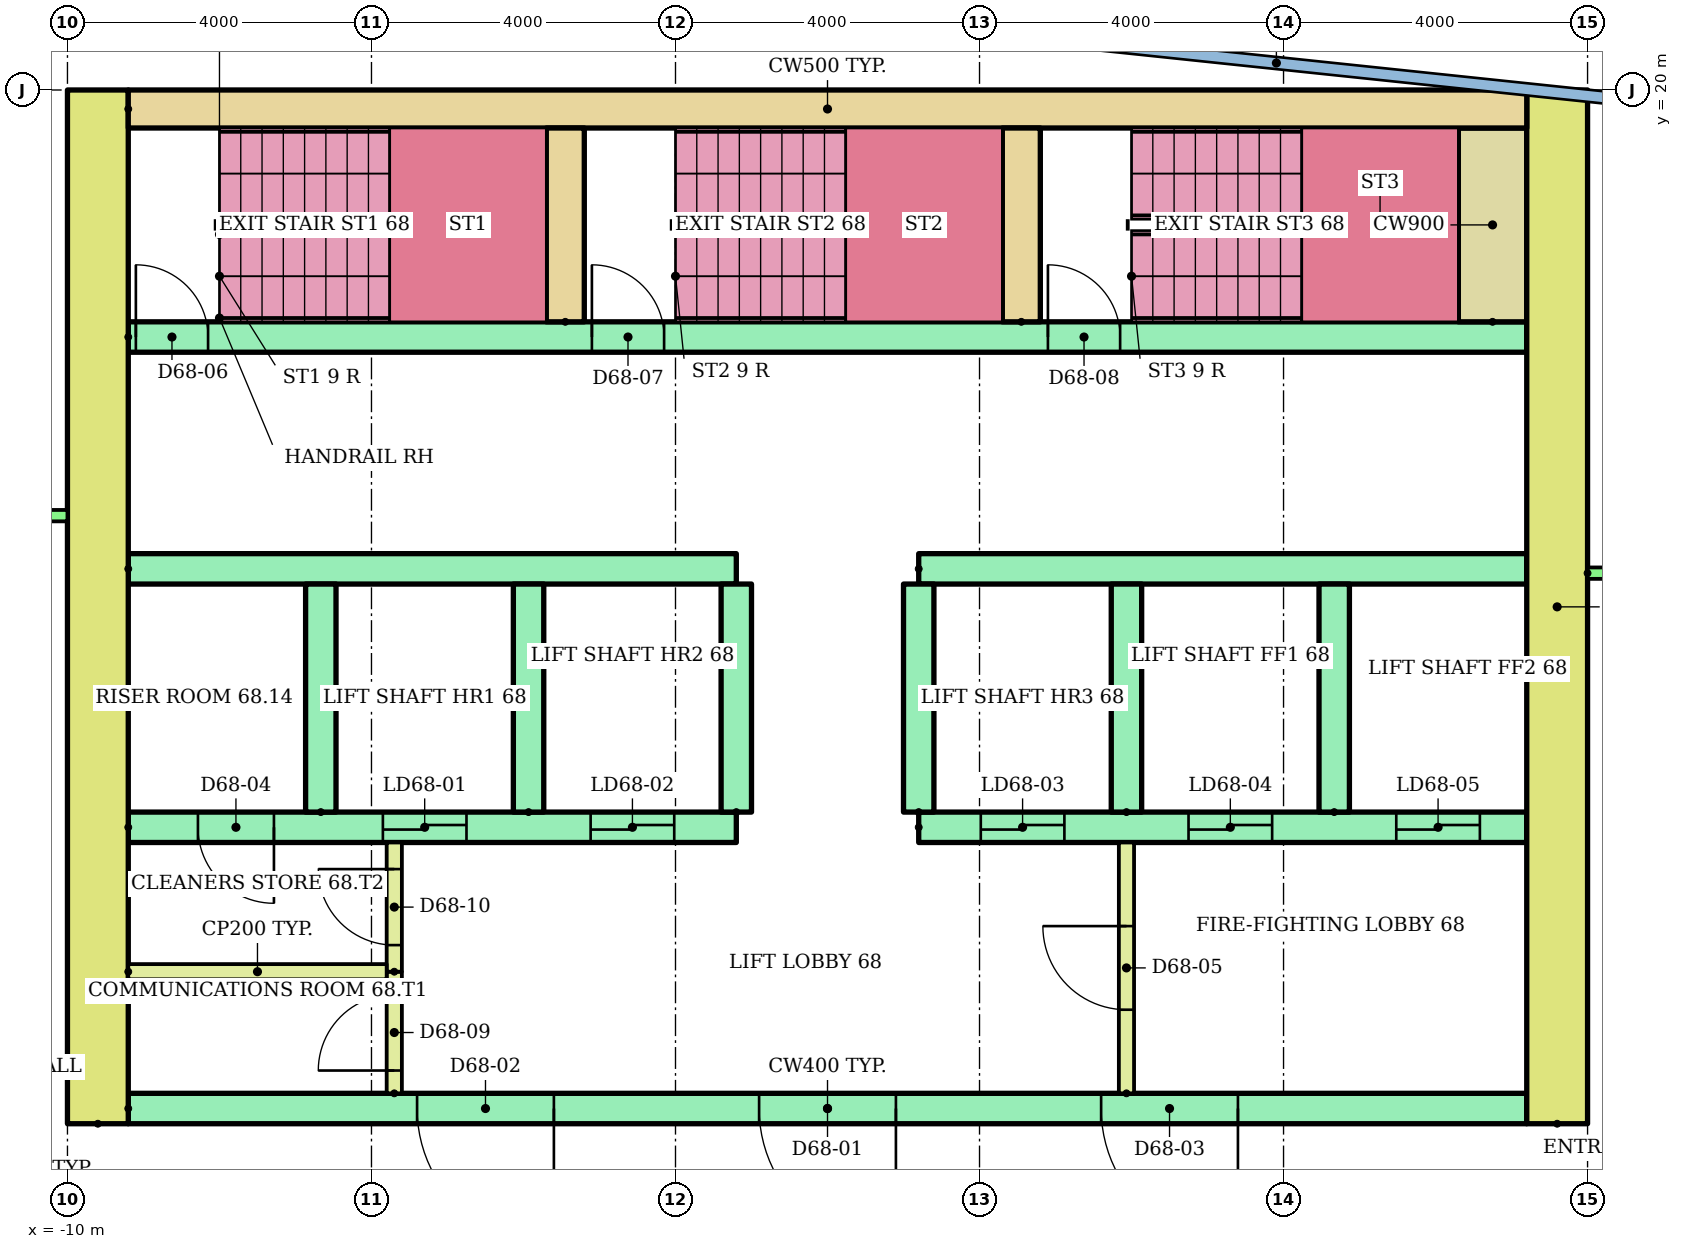
"""IFC4 building model, lengths in metres.
Left out: names, types, materials, properties, quantities, classifications, styles, units other than length and angle.
Written with IfcOpenShell. Run it as: python <this file> out.ifc"""

import sys

from ifc_helpers import new_model, si_unit, direction, frame, frame_2d, origin, place, context, subcontext, project, spatial, rectangle, extrude, element, fill, save


model = new_model("IFC4")
c1 = context("Model", 3, precision=1e-05, world=origin(), true_north=direction((0.0, 1.0)))
c2 = subcontext(c1, "Body", "Model", "MODEL_VIEW")
j1 = project(units=[si_unit("LENGTHUNIT", "METRE"), si_unit("PLANEANGLEUNIT", "RADIAN")], contexts=[c1])
p1 = place(None, origin())
s1 = spatial("IfcSite", under=j1, at=p1, CompositionType="ELEMENT")
p2 = place(p1, origin())
s2 = spatial("IfcBuilding", under=s1, at=p2, CompositionType="ELEMENT")
p3 = place(p2, frame((0.0, 0.0, 262.7)))
s3 = spatial("IfcBuildingStorey", under=s2, at=p3, CompositionType="ELEMENT", Elevation=262.7)
for number, where, z_axis, x_axis in (
    (1, (-9.6, 6.4, 0.0), (0.0, 0.0, 1.0), (0.0, 1.0, 0.0)),
    (2, (9.6, 6.4, 0.0), (0.0, 0.0, 1.0), (0.0, 1.0, 0.0)),
):
    element("IfcWall", number, at=place(p3, frame(where, z_axis=z_axis, x_axis=x_axis)), inside=s3, PredefinedType="SHEAR", context=c2, shape_type="SweptSolid", body=[
        extrude(rectangle(XDim=13.6, YDim=0.8, at=frame_2d((6.8, 0.0))), origin(), (0.0, 0.0, 1.0), 2.92),
    ])
p4 = place(p3, frame((-9.2, 19.75, 0.0)))
e3 = element("IfcWall", 3, at=p4, inside=s3, PredefinedType="SHEAR", context=c2, shape_type="SweptSolid", body=[
    extrude(rectangle(XDim=18.4, YDim=0.5, at=frame_2d((9.2, 0.0))), origin(), (0.0, 0.0, 1.0), 2.92),
])
p5 = place(p3, frame((-9.2, 6.6, 0.0)))
e4 = element("IfcWall", 4, at=p5, inside=s3, PredefinedType="SHEAR", context=c2, shape_type="SweptSolid", body=[
    extrude(rectangle(XDim=18.4, YDim=0.4, at=frame_2d((9.2, 0.0))), origin(), (0.0, 0.0, 1.0), 2.92),
])
p6 = place(p5, frame((8.3, 0.0, 0.0)))
e5 = element("IfcOpeningElement", 5, at=p6, cuts=e4, PredefinedType="OPENING", context=c2, shape_type="SweptSolid", body=[
    extrude(rectangle(XDim=1.8, YDim=2.1, at=frame_2d((0.9, 1.05))), frame((0.0, 0.21, 0.0), z_axis=(0.0, -1.0, 0.0), x_axis=(1.0, 0.0, 0.0)), (0.0, 0.0, 1.0), 0.42),
])
p7 = place(p5, frame((3.8, 0.0, 0.0)))
e6 = element("IfcOpeningElement", 6, at=p7, cuts=e4, PredefinedType="OPENING", context=c2, shape_type="SweptSolid", body=[
    extrude(rectangle(XDim=1.8, YDim=2.1, at=frame_2d((0.9, 1.05))), frame((0.0, 0.21, 0.0), z_axis=(0.0, -1.0, 0.0), x_axis=(1.0, 0.0, 0.0)), (0.0, 0.0, 1.0), 0.42),
])
p8 = place(p5, frame((12.8, 0.0, 0.0)))
e7 = element("IfcOpeningElement", 7, at=p8, cuts=e4, PredefinedType="OPENING", context=c2, shape_type="SweptSolid", body=[
    extrude(rectangle(XDim=1.8, YDim=2.1, at=frame_2d((0.9, 1.05))), frame((0.0, 0.21, 0.0), z_axis=(0.0, -1.0, 0.0), x_axis=(1.0, 0.0, 0.0)), (0.0, 0.0, 1.0), 0.42),
])
p9 = place(p3, frame((-9.2, 10.3, 0.0)))
e8 = element("IfcWall", 8, at=p9, inside=s3, PredefinedType="SHEAR", context=c2, shape_type="SweptSolid", body=[
    extrude(rectangle(XDim=8.0, YDim=0.4, at=frame_2d((4.0, 0.0))), origin(), (0.0, 0.0, 1.0), 2.92),
])
p10 = place(p9, frame((3.35, 0.0, 0.0)))
e9 = element("IfcOpeningElement", 9, at=p10, cuts=e8, PredefinedType="OPENING", context=c2, shape_type="SweptSolid", body=[
    extrude(rectangle(XDim=1.1, YDim=2.1, at=frame_2d((0.55, 1.05))), frame((0.0, 0.21, 0.0), z_axis=(0.0, -1.0, 0.0), x_axis=(1.0, 0.0, 0.0)), (0.0, 0.0, 1.0), 0.42),
])
p11 = place(p9, frame((6.083, 0.0, 0.0)))
e10 = element("IfcOpeningElement", 10, at=p11, cuts=e8, PredefinedType="OPENING", context=c2, shape_type="SweptSolid", body=[
    extrude(rectangle(XDim=1.1, YDim=2.1, at=frame_2d((0.55, 1.05))), frame((0.0, 0.21, 0.0), z_axis=(0.0, -1.0, 0.0), x_axis=(1.0, 0.0, 0.0)), (0.0, 0.0, 1.0), 0.42),
])
p12 = place(p9, frame((0.917, 0.0, 0.0)))
e11 = element("IfcOpeningElement", 11, at=p12, cuts=e8, PredefinedType="OPENING", context=c2, shape_type="SweptSolid", body=[
    extrude(rectangle(XDim=1.0, YDim=2.1, at=frame_2d((0.5, 1.05))), frame((0.0, 0.21, 0.0), z_axis=(0.0, -1.0, 0.0), x_axis=(1.0, 0.0, 0.0)), (0.0, 0.0, 1.0), 0.42),
])
p13 = place(p3, frame((-9.2, 13.7, 0.0)))
e12 = element("IfcWall", 12, at=p13, inside=s3, PredefinedType="SHEAR", context=c2, shape_type="SweptSolid", body=[
    extrude(rectangle(XDim=8.0, YDim=0.4, at=frame_2d((4.0, 0.0))), origin(), (0.0, 0.0, 1.0), 2.92),
])
p14 = place(p3, frame((1.2, 10.3, 0.0)))
e13 = element("IfcWall", 13, at=p14, inside=s3, PredefinedType="SHEAR", context=c2, shape_type="SweptSolid", body=[
    extrude(rectangle(XDim=8.0, YDim=0.4, at=frame_2d((4.0, 0.0))), origin(), (0.0, 0.0, 1.0), 2.92),
])
p15 = place(p14, frame((0.817, 0.0, 0.0)))
e14 = element("IfcOpeningElement", 14, at=p15, cuts=e13, PredefinedType="OPENING", context=c2, shape_type="SweptSolid", body=[
    extrude(rectangle(XDim=1.1, YDim=2.1, at=frame_2d((0.55, 1.05))), frame((0.0, 0.21, 0.0), z_axis=(0.0, -1.0, 0.0), x_axis=(1.0, 0.0, 0.0)), (0.0, 0.0, 1.0), 0.42),
])
p16 = place(p14, frame((3.55, 0.0, 0.0)))
e15 = element("IfcOpeningElement", 15, at=p16, cuts=e13, PredefinedType="OPENING", context=c2, shape_type="SweptSolid", body=[
    extrude(rectangle(XDim=1.1, YDim=2.1, at=frame_2d((0.55, 1.05))), frame((0.0, 0.21, 0.0), z_axis=(0.0, -1.0, 0.0), x_axis=(1.0, 0.0, 0.0)), (0.0, 0.0, 1.0), 0.42),
])
p17 = place(p14, frame((6.283, 0.0, 0.0)))
e16 = element("IfcOpeningElement", 16, at=p17, cuts=e13, PredefinedType="OPENING", context=c2, shape_type="SweptSolid", body=[
    extrude(rectangle(XDim=1.1, YDim=2.1, at=frame_2d((0.55, 1.05))), frame((0.0, 0.21, 0.0), z_axis=(0.0, -1.0, 0.0), x_axis=(1.0, 0.0, 0.0)), (0.0, 0.0, 1.0), 0.42),
])
p18 = place(p3, frame((1.2, 13.7, 0.0)))
e17 = element("IfcWall", 17, at=p18, inside=s3, PredefinedType="SHEAR", context=c2, shape_type="SweptSolid", body=[
    extrude(rectangle(XDim=8.0, YDim=0.4, at=frame_2d((4.0, 0.0))), origin(), (0.0, 0.0, 1.0), 2.92),
])
for number, where, z_axis, x_axis in (
    (18, (-6.667, 10.5, 0.0), (0.0, 0.0, 1.0), (0.0, 1.0, 0.0)),
    (19, (-3.933, 10.5, 0.0), (0.0, 0.0, 1.0), (0.0, 1.0, 0.0)),
    (20, (-1.2, 10.5, 0.0), (0.0, 0.0, 1.0), (0.0, 1.0, 0.0)),
    (21, (1.2, 10.5, 0.0), (0.0, 0.0, 1.0), (0.0, 1.0, 0.0)),
    (22, (3.933, 10.5, 0.0), (0.0, 0.0, 1.0), (0.0, 1.0, 0.0)),
    (23, (6.667, 10.5, 0.0), (0.0, 0.0, 1.0), (0.0, 1.0, 0.0)),
):
    element("IfcWall", number, at=place(p3, frame(where, z_axis=z_axis, x_axis=x_axis)), inside=s3, PredefinedType="SHEAR", context=c2, shape_type="SweptSolid", body=[
        extrude(rectangle(XDim=3.0, YDim=0.4, at=frame_2d((1.5, 0.0))), origin(), (0.0, 0.0, 1.0), 2.92),
    ])
p19 = place(p3, frame((3.933, 6.8, 0.0), z_axis=(0.0, 0.0, 1.0), x_axis=(0.0, 1.0, 0.0)))
e24 = element("IfcWall", 24, at=p19, inside=s3, PredefinedType="PARTITIONING", context=c2, shape_type="SweptSolid", body=[
    extrude(rectangle(XDim=3.3, YDim=0.2, at=frame_2d((1.65, 0.0))), origin(), (0.0, 0.0, 1.0), 2.92),
])
p20 = place(p19, frame((1.1, 0.0, 0.0)))
e25 = element("IfcOpeningElement", 25, at=p20, cuts=e24, PredefinedType="OPENING", context=c2, shape_type="SweptSolid", body=[
    extrude(rectangle(XDim=1.1, YDim=2.1, at=frame_2d((0.55, 1.05))), frame((0.0, 0.11, 0.0), z_axis=(0.0, -1.0, 0.0), x_axis=(1.0, 0.0, 0.0)), (0.0, 0.0, 1.0), 0.22),
])
p21 = place(p3, frame((-9.2, 16.75, 0.0)))
e26 = element("IfcWall", 26, at=p21, inside=s3, PredefinedType="SHEAR", context=c2, shape_type="SweptSolid", body=[
    extrude(rectangle(XDim=18.4, YDim=0.4, at=frame_2d((9.2, 0.0))), origin(), (0.0, 0.0, 1.0), 2.92),
])
p22 = place(p21, frame((0.1, 0.0, 0.0)))
e27 = element("IfcOpeningElement", 27, at=p22, cuts=e26, PredefinedType="OPENING", context=c2, shape_type="SweptSolid", body=[
    extrude(rectangle(XDim=0.95, YDim=2.1, at=frame_2d((0.475, 1.05))), frame((0.0, 0.21, 0.0), z_axis=(0.0, -1.0, 0.0), x_axis=(1.0, 0.0, 0.0)), (0.0, 0.0, 1.0), 0.42),
])
p23 = place(p21, frame((6.1, 0.0, 0.0)))
e28 = element("IfcOpeningElement", 28, at=p23, cuts=e26, PredefinedType="OPENING", context=c2, shape_type="SweptSolid", body=[
    extrude(rectangle(XDim=0.95, YDim=2.1, at=frame_2d((0.475, 1.05))), frame((0.0, 0.21, 0.0), z_axis=(0.0, -1.0, 0.0), x_axis=(1.0, 0.0, 0.0)), (0.0, 0.0, 1.0), 0.42),
])
p24 = place(p21, frame((12.1, 0.0, 0.0)))
e29 = element("IfcOpeningElement", 29, at=p24, cuts=e26, PredefinedType="OPENING", context=c2, shape_type="SweptSolid", body=[
    extrude(rectangle(XDim=0.95, YDim=2.1, at=frame_2d((0.475, 1.05))), frame((0.0, 0.21, 0.0), z_axis=(0.0, -1.0, 0.0), x_axis=(1.0, 0.0, 0.0)), (0.0, 0.0, 1.0), 0.42),
])
for number, where, z_axis, x_axis in (
    (30, (-3.45, 16.95, 0.0), (0.0, 0.0, 1.0), (0.0, 1.0, 0.0)),
    (31, (2.55, 16.95, 0.0), (0.0, 0.0, 1.0), (0.0, 1.0, 0.0)),
):
    element("IfcWall", number, at=place(p3, frame(where, z_axis=z_axis, x_axis=x_axis)), inside=s3, PredefinedType="SHEAR", context=c2, shape_type="SweptSolid", body=[
        extrude(rectangle(XDim=2.55, YDim=0.5, at=frame_2d((1.275, 0.0))), origin(), (0.0, 0.0, 1.0), 2.92),
    ])
p25 = place(p3, frame((8.75, 16.95, 0.0), z_axis=(0.0, 0.0, 1.0), x_axis=(0.0, 1.0, 0.0)))
e32 = element("IfcWall", 32, at=p25, inside=s3, PredefinedType="SHEAR", context=c2, shape_type="SweptSolid", body=[
    extrude(rectangle(XDim=2.55, YDim=0.9, at=frame_2d((1.275, 0.0))), origin(), (0.0, 0.0, 1.0), 2.92),
])
p26 = place(p3, frame((-5.7, 6.8, 0.0), z_axis=(0.0, 0.0, 1.0), x_axis=(0.0, 1.0, 0.0)))
e33 = element("IfcWall", 33, at=p26, inside=s3, PredefinedType="PARTITIONING", context=c2, shape_type="SweptSolid", body=[
    extrude(rectangle(XDim=1.6, YDim=0.2, at=frame_2d((0.8, 0.0))), origin(), (0.0, 0.0, 1.0), 2.92),
])
p27 = place(p26, frame((0.3, 0.0, 0.0)))
e34 = element("IfcOpeningElement", 34, at=p27, cuts=e33, PredefinedType="OPENING", context=c2, shape_type="SweptSolid", body=[
    extrude(rectangle(XDim=1.0, YDim=2.1, at=frame_2d((0.5, 1.05))), frame((0.0, 0.11, 0.0), z_axis=(0.0, -1.0, 0.0), x_axis=(1.0, 0.0, 0.0)), (0.0, 0.0, 1.0), 0.22),
])
p28 = place(p3, frame((-5.7, 8.4, 0.0), z_axis=(0.0, 0.0, 1.0), x_axis=(0.0, 1.0, 0.0)))
e35 = element("IfcWall", 35, at=p28, inside=s3, PredefinedType="PARTITIONING", context=c2, shape_type="SweptSolid", body=[
    extrude(rectangle(XDim=1.7, YDim=0.2, at=frame_2d((0.85, 0.0))), origin(), (0.0, 0.0, 1.0), 2.92),
])
p29 = place(p28, frame((0.35, 0.0, 0.0)))
e36 = element("IfcOpeningElement", 36, at=p29, cuts=e35, PredefinedType="OPENING", context=c2, shape_type="SweptSolid", body=[
    extrude(rectangle(XDim=1.0, YDim=2.1, at=frame_2d((0.5, 1.05))), frame((0.0, 0.11, 0.0), z_axis=(0.0, -1.0, 0.0), x_axis=(1.0, 0.0, 0.0)), (0.0, 0.0, 1.0), 0.22),
])
p30 = place(p3, frame((-9.2, 8.4, 0.0)))
e37 = element("IfcWall", 37, at=p30, inside=s3, PredefinedType="PARTITIONING", context=c2, shape_type="SweptSolid", body=[
    extrude(rectangle(XDim=3.4, YDim=0.2, at=frame_2d((1.7, 0.0))), origin(), (0.0, 0.0, 1.0), 2.92),
])
p31 = place(p3, frame((-21.89, 14.4, 0.0)))
e38 = element("IfcWall", 38, at=p31, inside=s3, PredefinedType="PARTITIONING", context=c2, shape_type="SweptSolid", body=[
    extrude(rectangle(XDim=11.89, YDim=0.15, at=frame_2d((5.945, 0.0))), origin(), (0.0, 0.0, 1.0), 2.4),
])
p32 = place(p31, frame((1.26, 0.0, 0.0)))
e39 = element("IfcOpeningElement", 39, at=p32, cuts=e38, PredefinedType="OPENING", context=c2, shape_type="SweptSolid", body=[
    extrude(rectangle(XDim=1.0, YDim=2.1, at=frame_2d((0.5, 1.05))), frame((0.0, 0.085, 0.0), z_axis=(0.0, -1.0, 0.0), x_axis=(1.0, 0.0, 0.0)), (0.0, 0.0, 1.0), 0.17),
])
p33 = place(p31, frame((8.304, 0.0, 0.0)))
e40 = element("IfcOpeningElement", 40, at=p33, cuts=e38, PredefinedType="OPENING", context=c2, shape_type="SweptSolid", body=[
    extrude(rectangle(XDim=0.9, YDim=2.1, at=frame_2d((0.45, 1.05))), frame((0.0, 0.085, 0.0), z_axis=(0.0, -1.0, 0.0), x_axis=(1.0, 0.0, 0.0)), (0.0, 0.0, 1.0), 0.17),
])
p34 = place(p3, frame((10.0, 13.643, 0.0)))
e41 = element("IfcWall", 41, at=p34, inside=s3, PredefinedType="PARTITIONING", context=c2, shape_type="SweptSolid", body=[
    extrude(rectangle(XDim=20.641, YDim=0.15, at=frame_2d((10.32, 0.0))), origin(), (0.0, 0.0, 1.0), 2.4),
])
p35 = place(p34, frame((3.42, 0.0, 0.0)))
e42 = element("IfcOpeningElement", 42, at=p35, cuts=e41, PredefinedType="OPENING", context=c2, shape_type="SweptSolid", body=[
    extrude(rectangle(XDim=1.0, YDim=2.1, at=frame_2d((0.5, 1.05))), frame((0.0, 0.085, 0.0), z_axis=(0.0, -1.0, 0.0), x_axis=(1.0, 0.0, 0.0)), (0.0, 0.0, 1.0), 0.17),
])
p36 = place(p34, frame((11.368, 0.0, 0.0)))
e43 = element("IfcOpeningElement", 43, at=p36, cuts=e41, PredefinedType="OPENING", context=c2, shape_type="SweptSolid", body=[
    extrude(rectangle(XDim=0.9, YDim=2.1, at=frame_2d((0.45, 1.05))), frame((0.0, 0.085, 0.0), z_axis=(0.0, -1.0, 0.0), x_axis=(1.0, 0.0, 0.0)), (0.0, 0.0, 1.0), 0.17),
])
p37 = place(p34, frame((18.477, 0.0, 0.0)))
e44 = element("IfcOpeningElement", 44, at=p37, cuts=e41, PredefinedType="OPENING", context=c2, shape_type="SweptSolid", body=[
    extrude(rectangle(XDim=0.9, YDim=2.1, at=frame_2d((0.45, 1.05))), frame((0.0, 0.085, 0.0), z_axis=(0.0, -1.0, 0.0), x_axis=(1.0, 0.0, 0.0)), (0.0, 0.0, 1.0), 0.17),
])
p38 = place(p6, frame((1.8, 0.0, 0.0), z_axis=(0.0, 0.0, 1.0), x_axis=(-1.0, 0.0, 0.0)))
e45 = element("IfcDoor", 45, at=p38, inside=s3, OperationType="DOUBLE_DOOR_SINGLE_SWING", PredefinedType="DOOR", context=c2, shape_type="SweptSolid", body=[
    extrude(rectangle(XDim=1.8, YDim=2.1, at=frame_2d((0.9, 1.05))), frame((0.0, 0.025, 0.0), z_axis=(0.0, -1.0, 0.0), x_axis=(1.0, 0.0, 0.0)), (0.0, 0.0, 1.0), 0.05),
])
fill(e5, e45)
p39 = place(p7, frame((1.8, 0.0, 0.0), z_axis=(0.0, 0.0, 1.0), x_axis=(-1.0, 0.0, 0.0)))
e46 = element("IfcDoor", 46, at=p39, inside=s3, OperationType="DOUBLE_DOOR_SINGLE_SWING", PredefinedType="DOOR", context=c2, shape_type="SweptSolid", body=[
    extrude(rectangle(XDim=1.8, YDim=2.1, at=frame_2d((0.9, 1.05))), frame((0.0, 0.025, 0.0), z_axis=(0.0, -1.0, 0.0), x_axis=(1.0, 0.0, 0.0)), (0.0, 0.0, 1.0), 0.05),
])
fill(e6, e46)
p40 = place(p8, frame((1.8, 0.0, 0.0), z_axis=(0.0, 0.0, 1.0), x_axis=(-1.0, 0.0, 0.0)))
e47 = element("IfcDoor", 47, at=p40, inside=s3, OperationType="DOUBLE_DOOR_SINGLE_SWING", PredefinedType="DOOR", context=c2, shape_type="SweptSolid", body=[
    extrude(rectangle(XDim=1.8, YDim=2.1, at=frame_2d((0.9, 1.05))), frame((0.0, 0.025, 0.0), z_axis=(0.0, -1.0, 0.0), x_axis=(1.0, 0.0, 0.0)), (0.0, 0.0, 1.0), 0.05),
])
fill(e7, e47)
p41 = place(p10, origin())
e48 = element("IfcDoor", 48, at=p41, inside=s3, OperationType="SLIDING_TO_LEFT", PredefinedType="DOOR", context=c2, shape_type="SweptSolid", body=[
    extrude(rectangle(XDim=1.1, YDim=2.1, at=frame_2d((0.55, 1.05))), frame((0.0, 0.025, 0.0), z_axis=(0.0, -1.0, 0.0), x_axis=(1.0, 0.0, 0.0)), (0.0, 0.0, 1.0), 0.05),
])
fill(e9, e48)
p42 = place(p11, origin())
e49 = element("IfcDoor", 49, at=p42, inside=s3, OperationType="SLIDING_TO_LEFT", PredefinedType="DOOR", context=c2, shape_type="SweptSolid", body=[
    extrude(rectangle(XDim=1.1, YDim=2.1, at=frame_2d((0.55, 1.05))), frame((0.0, 0.025, 0.0), z_axis=(0.0, -1.0, 0.0), x_axis=(1.0, 0.0, 0.0)), (0.0, 0.0, 1.0), 0.05),
])
fill(e10, e49)
p43 = place(p15, origin())
e50 = element("IfcDoor", 50, at=p43, inside=s3, OperationType="SLIDING_TO_LEFT", PredefinedType="DOOR", context=c2, shape_type="SweptSolid", body=[
    extrude(rectangle(XDim=1.1, YDim=2.1, at=frame_2d((0.55, 1.05))), frame((0.0, 0.025, 0.0), z_axis=(0.0, -1.0, 0.0), x_axis=(1.0, 0.0, 0.0)), (0.0, 0.0, 1.0), 0.05),
])
fill(e14, e50)
p44 = place(p16, origin())
e51 = element("IfcDoor", 51, at=p44, inside=s3, OperationType="SLIDING_TO_LEFT", PredefinedType="DOOR", context=c2, shape_type="SweptSolid", body=[
    extrude(rectangle(XDim=1.1, YDim=2.1, at=frame_2d((0.55, 1.05))), frame((0.0, 0.025, 0.0), z_axis=(0.0, -1.0, 0.0), x_axis=(1.0, 0.0, 0.0)), (0.0, 0.0, 1.0), 0.05),
])
fill(e15, e51)
p45 = place(p17, origin())
e52 = element("IfcDoor", 52, at=p45, inside=s3, OperationType="SLIDING_TO_LEFT", PredefinedType="DOOR", context=c2, shape_type="SweptSolid", body=[
    extrude(rectangle(XDim=1.1, YDim=2.1, at=frame_2d((0.55, 1.05))), frame((0.0, 0.025, 0.0), z_axis=(0.0, -1.0, 0.0), x_axis=(1.0, 0.0, 0.0)), (0.0, 0.0, 1.0), 0.05),
])
fill(e16, e52)
p46 = place(p12, frame((1.0, 0.0, 0.0), z_axis=(0.0, 0.0, 1.0), x_axis=(-1.0, 0.0, 0.0)))
e53 = element("IfcDoor", 53, at=p46, inside=s3, OperationType="SINGLE_SWING_RIGHT", PredefinedType="DOOR", context=c2, shape_type="SweptSolid", body=[
    extrude(rectangle(XDim=1.0, YDim=2.1, at=frame_2d((0.5, 1.05))), frame((0.0, 0.025, 0.0), z_axis=(0.0, -1.0, 0.0), x_axis=(1.0, 0.0, 0.0)), (0.0, 0.0, 1.0), 0.05),
])
fill(e11, e53)
p47 = place(p20, origin())
e54 = element("IfcDoor", 54, at=p47, inside=s3, OperationType="SINGLE_SWING_RIGHT", PredefinedType="DOOR", context=c2, shape_type="SweptSolid", body=[
    extrude(rectangle(XDim=1.1, YDim=2.1, at=frame_2d((0.55, 1.05))), frame((0.0, 0.025, 0.0), z_axis=(0.0, -1.0, 0.0), x_axis=(1.0, 0.0, 0.0)), (0.0, 0.0, 1.0), 0.05),
])
fill(e25, e54)
p48 = place(p22, origin())
e55 = element("IfcDoor", 55, at=p48, inside=s3, OperationType="SINGLE_SWING_LEFT", PredefinedType="DOOR", context=c2, shape_type="SweptSolid", body=[
    extrude(rectangle(XDim=0.95, YDim=2.1, at=frame_2d((0.475, 1.05))), frame((0.0, 0.025, 0.0), z_axis=(0.0, -1.0, 0.0), x_axis=(1.0, 0.0, 0.0)), (0.0, 0.0, 1.0), 0.05),
])
fill(e27, e55)
p49 = place(p23, origin())
e56 = element("IfcDoor", 56, at=p49, inside=s3, OperationType="SINGLE_SWING_LEFT", PredefinedType="DOOR", context=c2, shape_type="SweptSolid", body=[
    extrude(rectangle(XDim=0.95, YDim=2.1, at=frame_2d((0.475, 1.05))), frame((0.0, 0.025, 0.0), z_axis=(0.0, -1.0, 0.0), x_axis=(1.0, 0.0, 0.0)), (0.0, 0.0, 1.0), 0.05),
])
fill(e28, e56)
p50 = place(p24, origin())
e57 = element("IfcDoor", 57, at=p50, inside=s3, OperationType="SINGLE_SWING_LEFT", PredefinedType="DOOR", context=c2, shape_type="SweptSolid", body=[
    extrude(rectangle(XDim=0.95, YDim=2.1, at=frame_2d((0.475, 1.05))), frame((0.0, 0.025, 0.0), z_axis=(0.0, -1.0, 0.0), x_axis=(1.0, 0.0, 0.0)), (0.0, 0.0, 1.0), 0.05),
])
fill(e29, e57)
p51 = place(p27, origin())
e58 = element("IfcDoor", 58, at=p51, inside=s3, OperationType="SINGLE_SWING_LEFT", PredefinedType="DOOR", context=c2, shape_type="SweptSolid", body=[
    extrude(rectangle(XDim=1.0, YDim=2.1, at=frame_2d((0.5, 1.05))), frame((0.0, 0.025, 0.0), z_axis=(0.0, -1.0, 0.0), x_axis=(1.0, 0.0, 0.0)), (0.0, 0.0, 1.0), 0.05),
])
fill(e34, e58)
p52 = place(p29, origin())
e59 = element("IfcDoor", 59, at=p52, inside=s3, OperationType="SINGLE_SWING_RIGHT", PredefinedType="DOOR", context=c2, shape_type="SweptSolid", body=[
    extrude(rectangle(XDim=1.0, YDim=2.1, at=frame_2d((0.5, 1.05))), frame((0.0, 0.025, 0.0), z_axis=(0.0, -1.0, 0.0), x_axis=(1.0, 0.0, 0.0)), (0.0, 0.0, 1.0), 0.05),
])
fill(e36, e59)
save(model, sys.argv[1])
